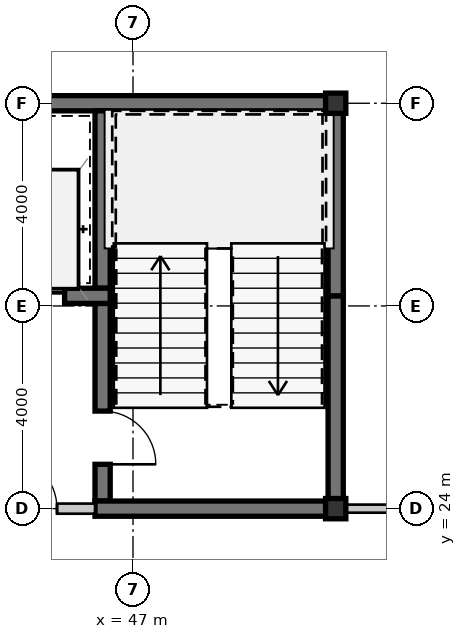
"""IFC4 building model, lengths in metres.
Left out: names, types, materials, properties, quantities, classifications, styles, units other than length and angle.
Written with IfcOpenShell. Run it as: python <this file> out.ifc"""

import sys

from ifc_helpers import new_model, si_unit, direction, frame, frame_2d, origin, origin_2d, place, context, subcontext, project, spatial, rectangle, hollow_rectangle, extrude, source, transform, mapped, element, fill, save


model = new_model("IFC4")
c1 = context("Model", 3, precision=1e-05, world=origin(), true_north=direction((0.0, 1.0)))
c2 = subcontext(c1, "Body", "Model", "MODEL_VIEW")
j1 = project(units=[si_unit("LENGTHUNIT", "METRE"), si_unit("PLANEANGLEUNIT", "RADIAN")], contexts=[c1])
p1 = place(None, origin())
s1 = spatial("IfcSite", under=j1, at=p1, CompositionType="ELEMENT")
p2 = place(p1, origin())
s2 = spatial("IfcBuilding", under=s1, at=p2, CompositionType="ELEMENT")
p3 = place(p2, frame((0.0, 0.0, 139.3)))
s3 = spatial("IfcBuildingStorey", under=s2, at=p3, CompositionType="ELEMENT", Elevation=139.3)
m1 = source(origin(), c2, "Body", "SweptSolid", [
    extrude(hollow_rectangle(XDim=0.4, YDim=0.4, WallThickness=0.016, at=origin_2d()), origin(), (0.0, 0.0, 1.0), 3.15),
])
for number, where, z_axis, x_axis in (
    (1, (51.0, 24.0, 0.0), (0.0, 0.0, 1.0), (1.0, 0.0, 0.0)),
    (2, (51.0, 32.0, 0.0), (0.0, 0.0, 1.0), (1.0, 0.0, 0.0)),
):
    element("IfcColumn", number, at=place(p3, frame(where, z_axis=z_axis, x_axis=x_axis)), inside=s3, PredefinedType="COLUMN", context=c2, shape_type="MappedRepresentation", body=[
        mapped(m1, transform((0.0, 0.0, 0.0), scale=1.0)),
    ])
m2 = source(origin(), c2, "Body", "SweptSolid", [
    extrude(rectangle(XDim=11.95, YDim=0.3, at=frame_2d((5.975, 0.0))), origin(), (0.0, 0.0, 1.0), 2.93),
])
p4 = place(p3, frame((39.2, 32.0, 0.0), z_axis=(0.0, 0.0, 1.0), x_axis=(1.0, 0.0, 0.0)))
e3 = element("IfcWall", 3, at=p4, inside=s3, PredefinedType="SHEAR", context=c2, shape_type="MappedRepresentation", body=[
    mapped(m2, transform((0.0, 0.0, 0.0), scale=1.0)),
])
m3 = source(origin(), c2, "Body", "SweptSolid", [
    extrude(rectangle(XDim=4.05, YDim=0.3, at=frame_2d((2.025, 0.0))), origin(), (0.0, 0.0, 1.0), 2.93),
])
p5 = place(p3, frame((51.0, 24.15, 0.0), z_axis=(0.0, 0.0, 1.0), x_axis=(0.0, 1.0, 0.0)))
e4 = element("IfcWall", 4, at=p5, inside=s3, PredefinedType="SHEAR", context=c2, shape_type="MappedRepresentation", body=[
    mapped(m3, transform((0.0, 0.0, 0.0), scale=1.0)),
])
m4 = source(origin(), c2, "Body", "SweptSolid", [
    extrude(rectangle(XDim=3.65, YDim=0.3, at=frame_2d((1.825, 0.0))), origin(), (0.0, 0.0, 1.0), 2.93),
])
p6 = place(p3, frame((51.0, 28.2, 0.0), z_axis=(0.0, 0.0, 1.0), x_axis=(0.0, 1.0, 0.0)))
e5 = element("IfcWall", 5, at=p6, inside=s3, PredefinedType="SHEAR", context=c2, shape_type="MappedRepresentation", body=[
    mapped(m4, transform((0.0, 0.0, 0.0), scale=1.0)),
])
m5 = source(origin(), c2, "Body", "SweptSolid", [
    extrude(rectangle(XDim=3.5, YDim=0.3, at=frame_2d((1.75, 0.0))), origin(), (0.0, 0.0, 1.0), 2.93),
])
p7 = place(p3, frame((46.4, 31.85, 0.0), z_axis=(0.0, 0.0, 1.0), x_axis=(0.0, -1.0, 0.0)))
e6 = element("IfcWall", 6, at=p7, inside=s3, PredefinedType="SHEAR", context=c2, shape_type="MappedRepresentation", body=[
    mapped(m5, transform((0.0, 0.0, 0.0), scale=1.0)),
])
m6 = source(origin(), c2, "Body", "SweptSolid", [
    extrude(rectangle(XDim=3.9, YDim=0.3, at=frame_2d((1.95, 0.0))), origin(), (0.0, 0.0, 1.0), 2.93),
])
p8 = place(p3, frame((46.4, 28.05, 0.0), z_axis=(0.0, 0.0, 1.0), x_axis=(0.0, -1.0, 0.0)))
e7 = element("IfcWall", 7, at=p8, inside=s3, PredefinedType="SHEAR", context=c2, shape_type="MappedRepresentation", body=[
    mapped(m6, transform((0.0, 0.0, 0.0), scale=1.0)),
])
m7 = source(origin(), c2, "Body", "SweptSolid", [
    extrude(rectangle(XDim=1.05, YDim=2.1, at=frame_2d((0.525, 1.05))), frame((0.0, 0.16, 0.0), z_axis=(0.0, -1.0, 0.0), x_axis=(1.0, 0.0, 0.0)), (0.0, 0.0, 1.0), 0.32),
])
p9 = place(p8, frame((2.125, 0.0, 0.0)))
e8 = element("IfcOpeningElement", 8, at=p9, cuts=e7, PredefinedType="OPENING", context=c2, shape_type="MappedRepresentation", body=[
    mapped(m7, transform((0.0, 0.0, 0.0), scale=1.0)),
])
m8 = source(origin(), c2, "Body", "SweptSolid", [
    extrude(rectangle(XDim=4.9, YDim=0.3, at=frame_2d((2.45, 0.0))), origin(), (0.0, 0.0, 1.0), 2.93),
])
p10 = place(p3, frame((46.25, 24.0, 0.0), z_axis=(0.0, 0.0, 1.0), x_axis=(1.0, 0.0, 0.0)))
e9 = element("IfcWall", 9, at=p10, inside=s3, PredefinedType="SHEAR", context=c2, shape_type="MappedRepresentation", body=[
    mapped(m8, transform((0.0, 0.0, 0.0), scale=1.0)),
])
m9 = source(origin(), c2, "Body", "SweptSolid", [
    extrude(rectangle(XDim=2.9, YDim=0.3, at=frame_2d((1.45, 0.0))), origin(), (0.0, 0.0, 1.0), 2.93),
])
p11 = place(p3, frame((43.65, 28.2, 0.0), z_axis=(0.0, 0.0, 1.0), x_axis=(1.0, 0.0, 0.0)))
e10 = element("IfcWall", 10, at=p11, inside=s3, PredefinedType="SHEAR", context=c2, shape_type="MappedRepresentation", body=[
    mapped(m9, transform((0.0, 0.0, 0.0), scale=1.0)),
])
m10 = source(origin(), c2, "Body", "SweptSolid", [
    extrude(rectangle(XDim=1.1, YDim=2.15, at=frame_2d((0.55, 1.075))), frame((0.0, 0.16, 0.0), z_axis=(0.0, -1.0, 0.0), x_axis=(1.0, 0.0, 0.0)), (0.0, 0.0, 1.0), 0.32),
])
p12 = place(p11, frame((0.9, 0.0, 0.0)))
e11 = element("IfcOpeningElement", 11, at=p12, cuts=e10, PredefinedType="OPENING", context=c2, shape_type="MappedRepresentation", body=[
    mapped(m10, transform((0.0, 0.0, 0.0), scale=1.0)),
])
m11 = source(origin(), c2, "Body", "SweptSolid", [
    extrude(rectangle(XDim=2.7, YDim=0.2, at=frame_2d((1.35, 0.0))), origin(), (0.0, 0.0, 1.0), 2.397),
])
p13 = place(p3, frame((43.55, 24.0, 0.0), z_axis=(0.0, 0.0, 1.0), x_axis=(1.0, 0.0, 0.0)))
e12 = element("IfcWall", 12, at=p13, inside=s3, PredefinedType="SOLIDWALL", context=c2, shape_type="MappedRepresentation", body=[
    mapped(m11, transform((0.0, 0.0, 0.0), scale=1.0)),
])
m12 = source(origin(), c2, "Body", "SweptSolid", [
    extrude(rectangle(XDim=1.05, YDim=2.1, at=frame_2d((0.525, 1.05))), frame((0.0, 0.11, 0.0), z_axis=(0.0, -1.0, 0.0), x_axis=(1.0, 0.0, 0.0)), (0.0, 0.0, 1.0), 0.22),
])
p14 = place(p13, frame((0.9, 0.0, 0.0)))
e13 = element("IfcOpeningElement", 13, at=p14, cuts=e12, PredefinedType="OPENING", context=c2, shape_type="MappedRepresentation", body=[
    mapped(m12, transform((0.0, 0.0, 0.0), scale=1.0)),
])
m13 = source(origin(), c2, "Body", "SweptSolid", [
    extrude(rectangle(XDim=10.1, YDim=0.16, at=frame_2d((5.05, 0.0))), origin(), (0.0, 0.0, 1.0), 2.93),
])
p15 = place(p3, frame((51.15, 24.0, 0.0), z_axis=(0.0, 0.0, 1.0), x_axis=(1.0, 0.0, 0.0)))
e14 = element("IfcWall", 14, at=p15, inside=s3, PredefinedType="PARTITIONING", context=c2, shape_type="MappedRepresentation", body=[
    mapped(m13, transform((0.0, 0.0, 0.0), scale=1.0)),
])
m14 = source(origin(), c2, "Body", "SweptSolid", [
    extrude(rectangle(XDim=0.92, YDim=2.1, at=frame_2d((0.46, 1.05))), frame((0.0, 0.09, 0.0), z_axis=(0.0, -1.0, 0.0), x_axis=(1.0, 0.0, 0.0)), (0.0, 0.0, 1.0), 0.18),
])
p16 = place(p15, frame((4.525, 0.0, 0.0)))
e15 = element("IfcOpeningElement", 15, at=p16, cuts=e14, PredefinedType="OPENING", context=c2, shape_type="MappedRepresentation", body=[
    mapped(m14, transform((0.0, 0.0, 0.0), scale=1.0)),
])
m15 = source(origin(), c2, "Body", "SweptSolid", [
    extrude(rectangle(XDim=1.05, YDim=2.1, at=frame_2d((0.525, 1.05))), frame((0.0, 0.025, 0.0), z_axis=(0.0, -1.0, 0.0), x_axis=(1.0, 0.0, 0.0)), (0.0, 0.0, 1.0), 0.05),
])
p17 = place(p9, origin())
e16 = element("IfcDoor", 16, at=p17, inside=s3, OperationType="SINGLE_SWING_RIGHT", PredefinedType="DOOR", context=c2, shape_type="MappedRepresentation", body=[
    mapped(m15, transform((0.0, 0.0, 0.0), scale=1.0)),
])
fill(e8, e16)
m16 = source(origin(), c2, "Body", "SweptSolid", [
    extrude(rectangle(XDim=1.1, YDim=2.15, at=frame_2d((0.55, 1.075))), frame((0.0, 0.025, 0.0), z_axis=(0.0, -1.0, 0.0), x_axis=(1.0, 0.0, 0.0)), (0.0, 0.0, 1.0), 0.05),
])
p18 = place(p12, origin())
e17 = element("IfcDoor", 17, at=p18, inside=s3, OperationType="SLIDING_TO_LEFT", PredefinedType="DOOR", context=c2, shape_type="MappedRepresentation", body=[
    mapped(m16, transform((0.0, 0.0, 0.0), scale=1.0)),
])
fill(e11, e17)
p19 = place(p14, origin())
e18 = element("IfcDoor", 18, at=p19, inside=s3, OperationType="SINGLE_SWING_LEFT", PredefinedType="DOOR", context=c2, shape_type="MappedRepresentation", body=[
    mapped(m15, transform((0.0, 0.0, 0.0), scale=1.0)),
])
fill(e13, e18)
save(model, sys.argv[1])
